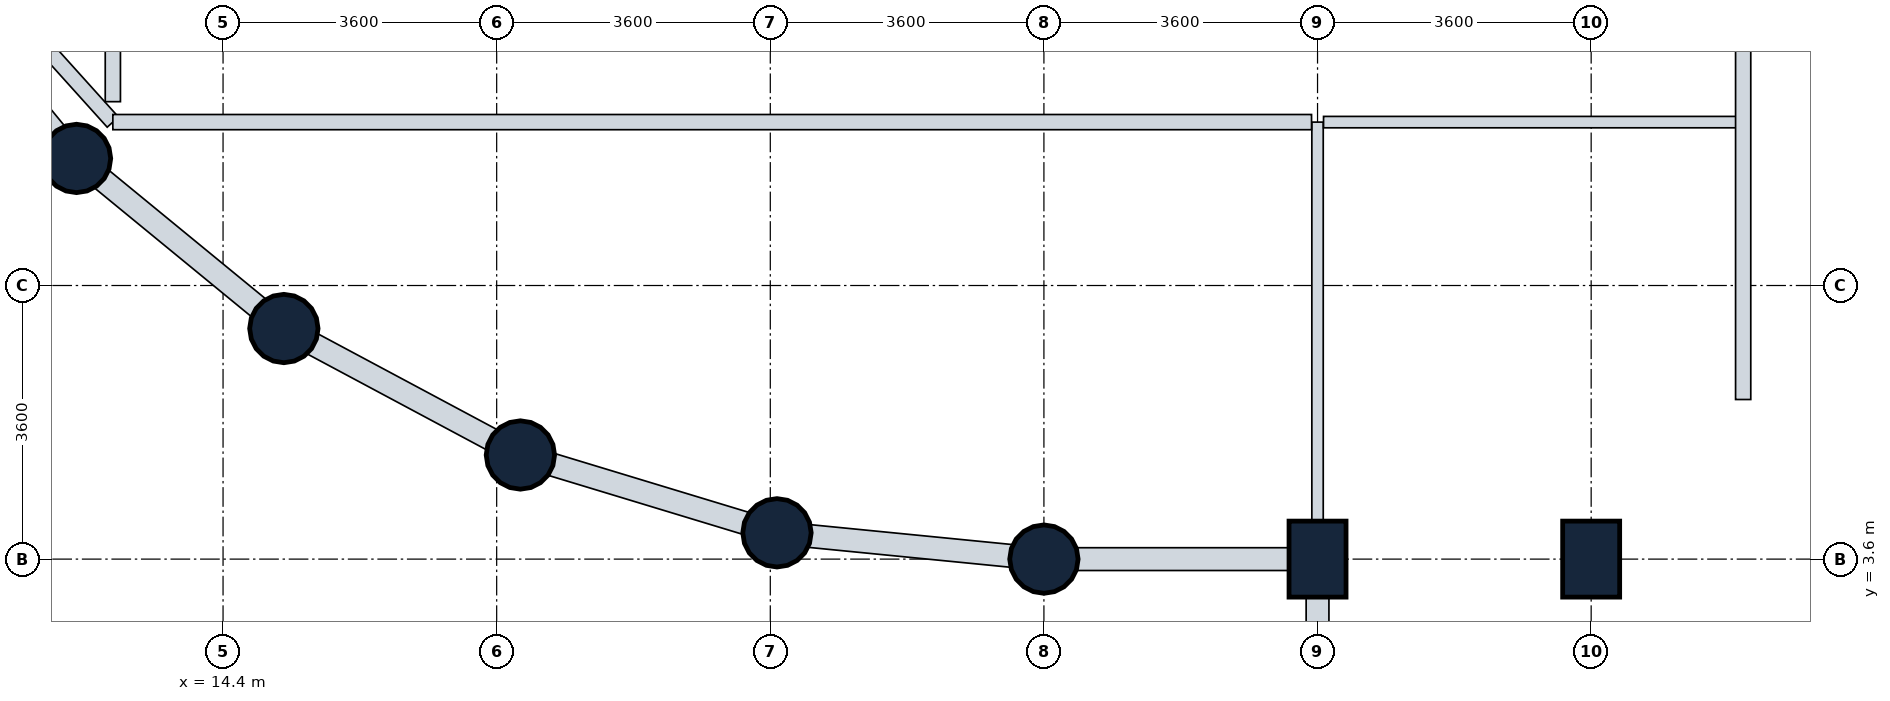
"""IFC4 building model, lengths in metres.
Left out: names, types, materials, properties, quantities, classifications, styles, units other than length and angle.
Written with IfcOpenShell. Run it as: python <this file> out.ifc"""

import sys

from ifc_helpers import new_model, si_unit, direction, frame, frame_2d, origin, origin_2d, place, context, subcontext, project, spatial, rectangle, circle, extrude, element, fill, save


model = new_model("IFC4")
c1 = context("Model", 3, precision=1e-05, world=origin(), true_north=direction((0.0, 1.0)))
c2 = subcontext(c1, "Body", "Model", "MODEL_VIEW")
j1 = project(units=[si_unit("LENGTHUNIT", "METRE"), si_unit("PLANEANGLEUNIT", "RADIAN")], contexts=[c1])
p1 = place(None, origin())
s1 = spatial("IfcSite", under=j1, at=p1, CompositionType="ELEMENT")
p2 = place(p1, origin())
s2 = spatial("IfcBuilding", under=s1, at=p2, CompositionType="ELEMENT")
p3 = place(p2, frame((0.0, 0.0, 139.0)))
s3 = spatial("IfcBuildingStorey", under=s2, at=p3, CompositionType="ELEMENT", Elevation=139.0)
for number, where, z_axis, x_axis in (
    (1, (12.472, 8.872, 0.0), (0.0, 0.0, 1.0), (1.0, 0.0, 0.0)),
    (2, (15.2, 6.634, 0.0), (0.0, 0.0, 1.0), (1.0, 0.0, 0.0)),
    (3, (18.312, 4.97, 0.0), (0.0, 0.0, 1.0), (1.0, 0.0, 0.0)),
    (4, (21.688, 3.946, 0.0), (0.0, 0.0, 1.0), (1.0, 0.0, 0.0)),
    (5, (25.2, 3.6, 0.0), (0.0, 0.0, 1.0), (1.0, 0.0, 0.0)),
):
    element("IfcColumn", number, at=place(p3, frame(where, z_axis=z_axis, x_axis=x_axis)), inside=s3, PredefinedType="COLUMN", context=c2, shape_type="SweptSolid", body=[
        extrude(circle(Radius=0.45, at=origin_2d()), origin(), (0.0, 0.0, 1.0), 3.8),
    ])
for number, where, z_axis, x_axis in (
    (6, (28.8, 3.6, 0.0), (0.0, 0.0, 1.0), (1.0, 0.0, 0.0)),
    (7, (32.4, 3.6, 0.0), (0.0, 0.0, 1.0), (1.0, 0.0, 0.0)),
):
    element("IfcColumn", number, at=place(p3, frame(where, z_axis=z_axis, x_axis=x_axis)), inside=s3, PredefinedType="COLUMN", context=c2, shape_type="SweptSolid", body=[
        extrude(rectangle(XDim=0.75, YDim=1.0, at=origin_2d()), origin(), (0.0, 0.0, 1.0), 3.8),
    ])
p4 = place(p3, frame((28.8, 3.6, 0.0), z_axis=(0.0, 0.0, 1.0), x_axis=(-1.0, 0.0, 0.0)))
e8 = element("IfcWall", 8, at=p4, inside=s3, PredefinedType="STANDARD", context=c2, shape_type="SweptSolid", body=[
    extrude(rectangle(XDim=3.6, YDim=0.3, at=frame_2d((1.8, 0.0))), origin(), (0.0, 0.0, 1.0), 2.93),
])
p5 = place(p4, frame((0.775, 0.0, 0.85)))
e9 = element("IfcOpeningElement", 9, at=p5, cuts=e8, PredefinedType="OPENING", context=c2, shape_type="SweptSolid", body=[
    extrude(rectangle(XDim=2.1, YDim=1.35, at=frame_2d((1.05, 0.675))), frame((0.0, 0.16, 0.0), z_axis=(0.0, -1.0, 0.0), x_axis=(1.0, 0.0, 0.0)), (0.0, 0.0, 1.0), 0.32),
])
p6 = place(p3, frame((28.8, 3.6, 0.0), z_axis=(0.0, 0.0, 1.0), x_axis=(0.0, -1.0, 0.0)))
e10 = element("IfcWall", 10, at=p6, inside=s3, PredefinedType="STANDARD", context=c2, shape_type="SweptSolid", body=[
    extrude(rectangle(XDim=2.1, YDim=0.3, at=frame_2d((1.05, 0.0))), origin(), (0.0, 0.0, 1.0), 2.93),
])
p7 = place(p3, frame((12.472, 8.872, 0.0), z_axis=(0.0, 0.0, 1.0), x_axis=(-0.634258295121, 0.773121216285, 0.0)))
e11 = element("IfcWall", 11, at=p7, inside=s3, PredefinedType="STANDARD", context=c2, shape_type="SweptSolid", body=[
    extrude(rectangle(XDim=3.529, YDim=0.3, at=frame_2d((1.764, 0.0))), origin(), (0.0, 0.0, 1.0), 2.93),
])
p8 = place(p7, frame((0.964, 0.0, 0.85)))
e12 = element("IfcOpeningElement", 12, at=p8, cuts=e11, PredefinedType="OPENING", context=c2, shape_type="SweptSolid", body=[
    extrude(rectangle(XDim=1.6, YDim=1.35, at=frame_2d((0.8, 0.675))), frame((0.0, 0.16, 0.0), z_axis=(0.0, -1.0, 0.0), x_axis=(1.0, 0.0, 0.0)), (0.0, 0.0, 1.0), 0.32),
])
p9 = place(p3, frame((15.2, 6.634, 0.0), z_axis=(0.0, 0.0, 1.0), x_axis=(-0.773121216285, 0.634258295121, 0.0)))
e13 = element("IfcWall", 13, at=p9, inside=s3, PredefinedType="STANDARD", context=c2, shape_type="SweptSolid", body=[
    extrude(rectangle(XDim=3.529, YDim=0.3, at=frame_2d((1.764, 0.0))), origin(), (0.0, 0.0, 1.0), 2.93),
])
p10 = place(p9, frame((0.964, 0.0, 0.85)))
e14 = element("IfcOpeningElement", 14, at=p10, cuts=e13, PredefinedType="OPENING", context=c2, shape_type="SweptSolid", body=[
    extrude(rectangle(XDim=1.6, YDim=1.35, at=frame_2d((0.8, 0.675))), frame((0.0, 0.16, 0.0), z_axis=(0.0, -1.0, 0.0), x_axis=(1.0, 0.0, 0.0)), (0.0, 0.0, 1.0), 0.32),
])
p11 = place(p3, frame((18.312, 4.97, 0.0), z_axis=(0.0, 0.0, 1.0), x_axis=(-0.881846862014, 0.471535907389, 0.0)))
e15 = element("IfcWall", 15, at=p11, inside=s3, PredefinedType="STANDARD", context=c2, shape_type="SweptSolid", body=[
    extrude(rectangle(XDim=3.529, YDim=0.3, at=frame_2d((1.765, 0.0))), origin(), (0.0, 0.0, 1.0), 2.93),
])
p12 = place(p11, frame((0.964, 0.0, 0.85)))
e16 = element("IfcOpeningElement", 16, at=p12, cuts=e15, PredefinedType="OPENING", context=c2, shape_type="SweptSolid", body=[
    extrude(rectangle(XDim=1.6, YDim=1.35, at=frame_2d((0.8, 0.675))), frame((0.0, 0.16, 0.0), z_axis=(0.0, -1.0, 0.0), x_axis=(1.0, 0.0, 0.0)), (0.0, 0.0, 1.0), 0.32),
])
p13 = place(p3, frame((21.688, 3.946, 0.0), z_axis=(0.0, 0.0, 1.0), x_axis=(-0.956953367403, 0.290241714123, 0.0)))
e17 = element("IfcWall", 17, at=p13, inside=s3, PredefinedType="STANDARD", context=c2, shape_type="SweptSolid", body=[
    extrude(rectangle(XDim=3.528, YDim=0.3, at=frame_2d((1.764, 0.0))), origin(), (0.0, 0.0, 1.0), 2.93),
])
p14 = place(p13, frame((0.964, 0.0, 0.85)))
e18 = element("IfcOpeningElement", 18, at=p14, cuts=e17, PredefinedType="OPENING", context=c2, shape_type="SweptSolid", body=[
    extrude(rectangle(XDim=1.6, YDim=1.35, at=frame_2d((0.8, 0.675))), frame((0.0, 0.16, 0.0), z_axis=(0.0, -1.0, 0.0), x_axis=(1.0, 0.0, 0.0)), (0.0, 0.0, 1.0), 0.32),
])
p15 = place(p3, frame((25.2, 3.6, 0.0), z_axis=(0.0, 0.0, 1.0), x_axis=(-0.995183369056, 0.098030923459, 0.0)))
e19 = element("IfcWall", 19, at=p15, inside=s3, PredefinedType="STANDARD", context=c2, shape_type="SweptSolid", body=[
    extrude(rectangle(XDim=3.529, YDim=0.3, at=frame_2d((1.765, 0.0))), origin(), (0.0, 0.0, 1.0), 2.93),
])
p16 = place(p15, frame((0.965, 0.0, 0.85)))
e20 = element("IfcOpeningElement", 20, at=p16, cuts=e19, PredefinedType="OPENING", context=c2, shape_type="SweptSolid", body=[
    extrude(rectangle(XDim=1.6, YDim=1.35, at=frame_2d((0.8, 0.675))), frame((0.0, 0.16, 0.0), z_axis=(0.0, -1.0, 0.0), x_axis=(1.0, 0.0, 0.0)), (0.0, 0.0, 1.0), 0.32),
])
p17 = place(p3, frame((28.8, 9.35, 0.0), z_axis=(0.0, 0.0, 1.0), x_axis=(0.0, -1.0, 0.0)))
e21 = element("IfcWall", 21, at=p17, inside=s3, PredefinedType="PARTITIONING", context=c2, shape_type="SweptSolid", body=[
    extrude(rectangle(XDim=5.596, YDim=0.15, at=frame_2d((2.798, 0.0))), origin(), (0.0, 0.0, 1.0), 3.535),
])
p18 = place(p3, frame((12.95, 9.35, 0.0), z_axis=(0.0, 0.0, 1.0), x_axis=(-0.669422074366, 0.742882282971, 0.0)))
e22 = element("IfcWall", 22, at=p18, inside=s3, PredefinedType="PARTITIONING", context=c2, shape_type="SweptSolid", body=[
    extrude(rectangle(XDim=4.6, YDim=0.2, at=frame_2d((2.3, 0.0))), origin(), (0.0, 0.0, 1.0), 2.93),
])
p19 = place(p3, frame((12.95, 9.619, 0.0), z_axis=(0.0, 0.0, 1.0), x_axis=(0.0, 1.0, 0.0)))
e23 = element("IfcWall", 23, at=p19, inside=s3, PredefinedType="PARTITIONING", context=c2, shape_type="SweptSolid", body=[
    extrude(rectangle(XDim=6.877, YDim=0.2, at=frame_2d((3.438, 0.0))), origin(), (0.0, 0.0, 1.0), 3.17),
])
p20 = place(p19, frame((3.962, 0.0, 0.0)))
e24 = element("IfcOpeningElement", 24, at=p20, cuts=e23, PredefinedType="OPENING", context=c2, shape_type="SweptSolid", body=[
    extrude(rectangle(XDim=1.0, YDim=2.1, at=frame_2d((0.5, 1.05))), frame((0.0, 0.11, 0.0), z_axis=(0.0, -1.0, 0.0), x_axis=(1.0, 0.0, 0.0)), (0.0, 0.0, 1.0), 0.22),
])
p21 = place(p3, frame((12.95, 9.35, 0.0), z_axis=(0.0, 0.0, 1.0), x_axis=(1.0, 0.0, 0.0)))
e25 = element("IfcWall", 25, at=p21, inside=s3, PredefinedType="PARTITIONING", context=c2, shape_type="SweptSolid", body=[
    extrude(rectangle(XDim=15.771, YDim=0.2, at=frame_2d((7.885, 0.0))), origin(), (0.0, 0.0, 1.0), 3.17),
])
p22 = place(p21, frame((4.836, 0.0, 0.0)))
e26 = element("IfcOpeningElement", 26, at=p22, cuts=e25, PredefinedType="OPENING", context=c2, shape_type="SweptSolid", body=[
    extrude(rectangle(XDim=1.0, YDim=2.1, at=frame_2d((0.5, 1.05))), frame((0.0, 0.11, 0.0), z_axis=(0.0, -1.0, 0.0), x_axis=(1.0, 0.0, 0.0)), (0.0, 0.0, 1.0), 0.22),
])
p23 = place(p3, frame((28.879, 9.35, 0.0), z_axis=(0.0, 0.0, 1.0), x_axis=(1.0, 0.0, 0.0)))
e27 = element("IfcWall", 27, at=p23, inside=s3, PredefinedType="PARTITIONING", context=c2, shape_type="SweptSolid", body=[
    extrude(rectangle(XDim=5.521, YDim=0.15, at=frame_2d((2.76, 0.0))), origin(), (0.0, 0.0, 1.0), 3.535),
])
p24 = place(p23, frame((0.36, 0.0, 0.0)))
e28 = element("IfcOpeningElement", 28, at=p24, cuts=e27, PredefinedType="OPENING", context=c2, shape_type="SweptSolid", body=[
    extrude(rectangle(XDim=1.0, YDim=2.1, at=frame_2d((0.5, 1.05))), frame((0.0, 0.085, 0.0), z_axis=(0.0, -1.0, 0.0), x_axis=(1.0, 0.0, 0.0)), (0.0, 0.0, 1.0), 0.17),
])
p25 = place(p3, frame((34.4, 5.7, 0.0), z_axis=(0.0, 0.0, 1.0), x_axis=(0.0, 1.0, 0.0)))
e29 = element("IfcWall", 29, at=p25, inside=s3, PredefinedType="PARTITIONING", context=c2, shape_type="SweptSolid", body=[
    extrude(rectangle(XDim=10.6, YDim=0.2, at=frame_2d((5.3, 0.0))), origin(), (0.0, 0.0, 1.0), 3.17),
])
p26 = place(p5, origin())
e30 = element("IfcWindow", 30, at=p26, inside=s3, PartitioningType="SINGLE_PANEL", PredefinedType="WINDOW", context=c2, shape_type="SweptSolid", body=[
    extrude(rectangle(XDim=2.1, YDim=1.35, at=frame_2d((1.05, 0.675))), frame((0.0, 0.03, 0.0), z_axis=(0.0, -1.0, 0.0), x_axis=(1.0, 0.0, 0.0)), (0.0, 0.0, 1.0), 0.06),
])
fill(e9, e30)
p27 = place(p10, origin())
e31 = element("IfcWindow", 31, at=p27, inside=s3, PartitioningType="SINGLE_PANEL", PredefinedType="WINDOW", context=c2, shape_type="SweptSolid", body=[
    extrude(rectangle(XDim=1.6, YDim=1.35, at=frame_2d((0.8, 0.675))), frame((0.0, 0.03, 0.0), z_axis=(0.0, -1.0, 0.0), x_axis=(1.0, 0.0, 0.0)), (0.0, 0.0, 1.0), 0.06),
])
fill(e14, e31)
p28 = place(p12, origin())
e32 = element("IfcWindow", 32, at=p28, inside=s3, PartitioningType="SINGLE_PANEL", PredefinedType="WINDOW", context=c2, shape_type="SweptSolid", body=[
    extrude(rectangle(XDim=1.6, YDim=1.35, at=frame_2d((0.8, 0.675))), frame((0.0, 0.03, 0.0), z_axis=(0.0, -1.0, 0.0), x_axis=(1.0, 0.0, 0.0)), (0.0, 0.0, 1.0), 0.06),
])
fill(e16, e32)
p29 = place(p14, origin())
e33 = element("IfcWindow", 33, at=p29, inside=s3, PartitioningType="SINGLE_PANEL", PredefinedType="WINDOW", context=c2, shape_type="SweptSolid", body=[
    extrude(rectangle(XDim=1.6, YDim=1.35, at=frame_2d((0.8, 0.675))), frame((0.0, 0.03, 0.0), z_axis=(0.0, -1.0, 0.0), x_axis=(1.0, 0.0, 0.0)), (0.0, 0.0, 1.0), 0.06),
])
fill(e18, e33)
p30 = place(p16, origin())
e34 = element("IfcWindow", 34, at=p30, inside=s3, PartitioningType="SINGLE_PANEL", PredefinedType="WINDOW", context=c2, shape_type="SweptSolid", body=[
    extrude(rectangle(XDim=1.6, YDim=1.35, at=frame_2d((0.8, 0.675))), frame((0.0, 0.03, 0.0), z_axis=(0.0, -1.0, 0.0), x_axis=(1.0, 0.0, 0.0)), (0.0, 0.0, 1.0), 0.06),
])
fill(e20, e34)
p31 = place(p22, origin())
e35 = element("IfcDoor", 35, at=p31, inside=s3, OperationType="SINGLE_SWING_LEFT", PredefinedType="DOOR", context=c2, shape_type="SweptSolid", body=[
    extrude(rectangle(XDim=1.0, YDim=2.1, at=frame_2d((0.5, 1.05))), frame((0.0, 0.025, 0.0), z_axis=(0.0, -1.0, 0.0), x_axis=(1.0, 0.0, 0.0)), (0.0, 0.0, 1.0), 0.05),
])
fill(e26, e35)
p32 = place(p24, origin())
e36 = element("IfcDoor", 36, at=p32, inside=s3, OperationType="SINGLE_SWING_LEFT", PredefinedType="DOOR", context=c2, shape_type="SweptSolid", body=[
    extrude(rectangle(XDim=1.0, YDim=2.1, at=frame_2d((0.5, 1.05))), frame((0.0, 0.025, 0.0), z_axis=(0.0, -1.0, 0.0), x_axis=(1.0, 0.0, 0.0)), (0.0, 0.0, 1.0), 0.05),
])
fill(e28, e36)
save(model, sys.argv[1])
